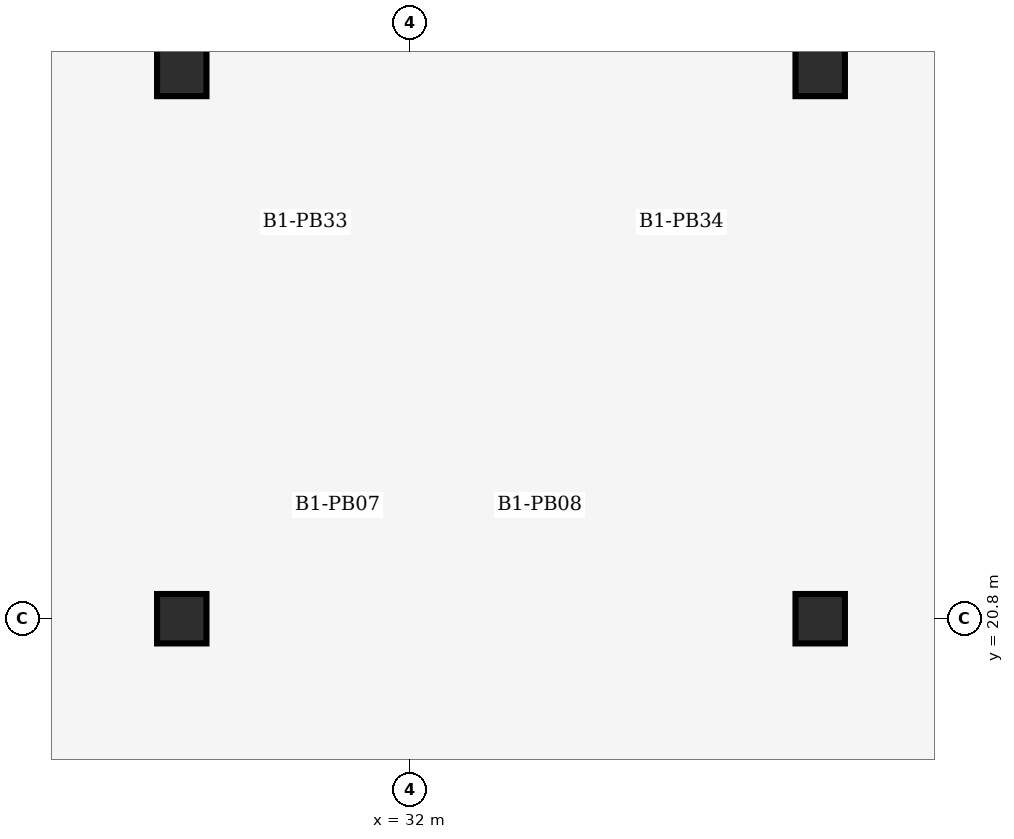
"""IFC4 building model, lengths in metres.
Left out: names, types, materials, properties, quantities, classifications, styles, units other than length and angle.
Written with IfcOpenShell. Run it as: python <this file> out.ifc"""

import sys

from ifc_helpers import new_model, si_unit, direction, frame, origin, origin_2d, place, context, subcontext, project, spatial, rectangle, extrude, element, save


model = new_model("IFC4")
c1 = context("Model", 3, precision=1e-05, world=origin(), true_north=direction((0.0, 1.0)))
c2 = subcontext(c1, "Body", "Model", "MODEL_VIEW")
j1 = project(units=[si_unit("LENGTHUNIT", "METRE"), si_unit("PLANEANGLEUNIT", "RADIAN")], contexts=[c1])
p1 = place(None, origin())
s1 = spatial("IfcSite", under=j1, at=p1, CompositionType="ELEMENT")
p2 = place(p1, origin())
s2 = spatial("IfcBuilding", under=s1, at=p2, CompositionType="ELEMENT")
p3 = place(p2, frame((0.0, 0.0, -4.8)))
s3 = spatial("IfcBuildingStorey", under=s2, at=p3, CompositionType="ELEMENT", Elevation=-4.8)
for number, where, z_axis, x_axis in (
    (1, (29.0, 20.8, 0.0), (0.0, 0.0, 1.0), (1.0, 0.0, 0.0)),
    (2, (29.0, 28.0, 0.0), (0.0, 0.0, 1.0), (1.0, 0.0, 0.0)),
    (3, (37.4, 20.8, 0.0), (0.0, 0.0, 1.0), (1.0, 0.0, 0.0)),
    (4, (37.4, 28.0, 0.0), (0.0, 0.0, 1.0), (1.0, 0.0, 0.0)),
):
    element("IfcColumn", number, at=place(p3, frame(where, z_axis=z_axis, x_axis=x_axis)), inside=s3, PredefinedType="COLUMN", context=c2, shape_type="SweptSolid", body=[
        extrude(rectangle(XDim=0.65, YDim=0.65, at=origin_2d()), origin(), (0.0, 0.0, 1.0), 4.8),
    ])
save(model, sys.argv[1])
